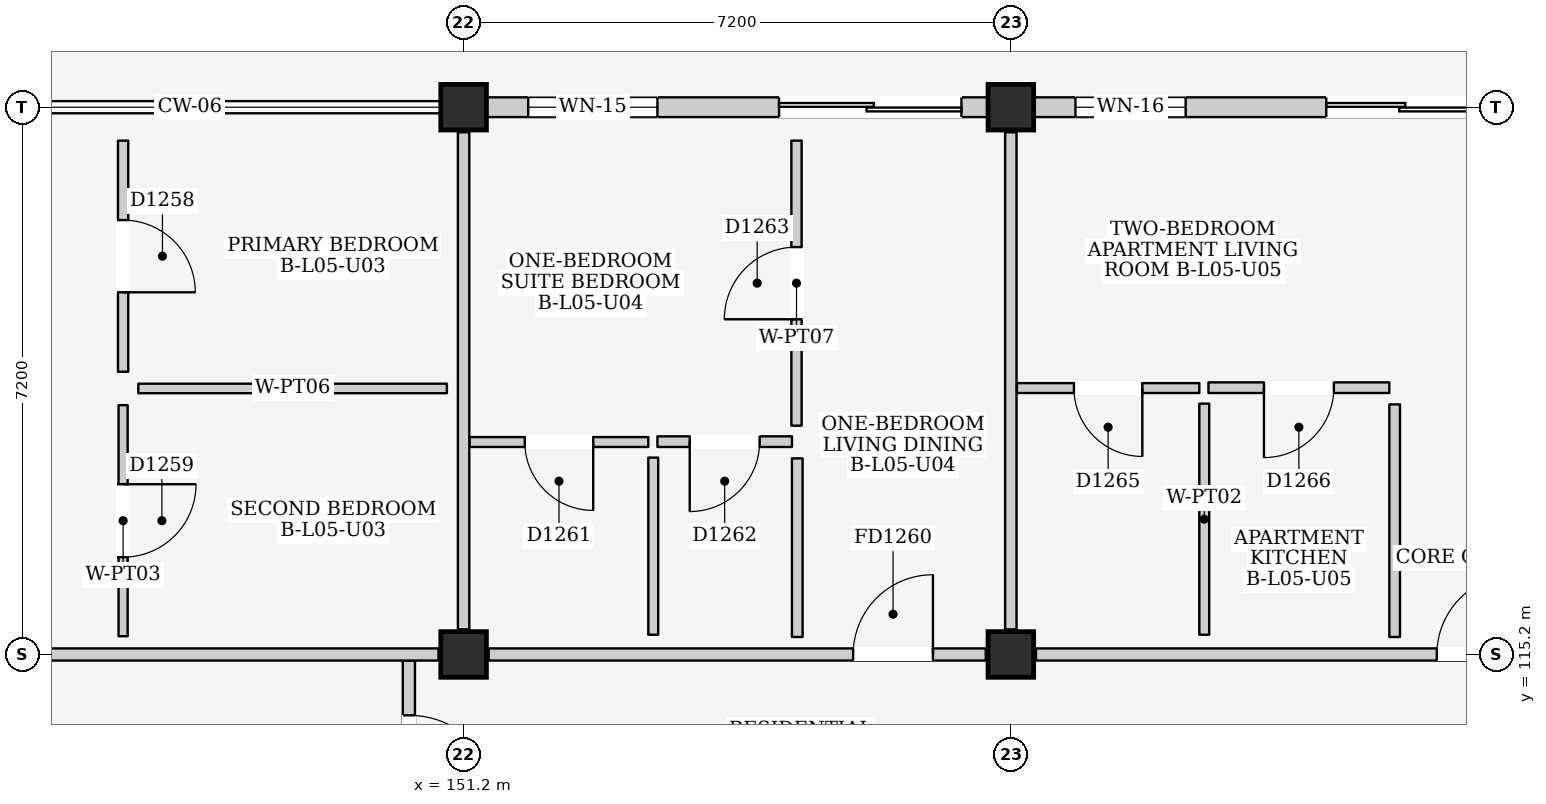
"""IFC4 building model, lengths in metres.
Left out: names, types, materials, properties, quantities, classifications, styles, units other than length and angle.
Written with IfcOpenShell. Run it as: python <this file> out.ifc"""

import sys

from ifc_helpers import new_model, si_unit, direction, frame, frame_2d, origin, origin_2d, place, context, subcontext, project, spatial, rectangle, extrude, element, fill, save


model = new_model("IFC4")
c1 = context("Model", 3, precision=1e-05, world=origin(), true_north=direction((0.0, 1.0)))
c2 = subcontext(c1, "Body", "Model", "MODEL_VIEW")
j1 = project(units=[si_unit("LENGTHUNIT", "METRE"), si_unit("PLANEANGLEUNIT", "RADIAN")], contexts=[c1])
p1 = place(None, origin())
s1 = spatial("IfcSite", under=j1, at=p1, CompositionType="ELEMENT")
p2 = place(p1, origin())
s2 = spatial("IfcBuilding", under=s1, at=p2, CompositionType="ELEMENT")
p3 = place(p2, frame((0.0, 0.0, 18.6)))
s3 = spatial("IfcBuildingStorey", under=s2, at=p3, CompositionType="ELEMENT", Elevation=18.6)
for number, where, z_axis, x_axis in (
    (1, (151.2, 115.2, 0.0), (0.0, 0.0, 1.0), (1.0, 0.0, 0.0)),
    (2, (151.2, 122.4, 0.0), (0.0, 0.0, 1.0), (1.0, 0.0, 0.0)),
    (3, (158.4, 115.2, 0.0), (0.0, 0.0, 1.0), (1.0, 0.0, 0.0)),
    (4, (158.4, 122.4, 0.0), (0.0, 0.0, 1.0), (1.0, 0.0, 0.0)),
):
    element("IfcColumn", number, at=place(p3, frame(where, z_axis=z_axis, x_axis=x_axis)), inside=s3, PredefinedType="COLUMN", context=c2, shape_type="SweptSolid", body=[
        extrude(rectangle(XDim=0.6, YDim=0.6, at=origin_2d()), origin(), (0.0, 0.0, 1.0), 3.3),
    ])
p4 = place(p3, frame((151.5, 122.4, 0.0), z_axis=(0.0, 0.0, 1.0), x_axis=(1.0, 0.0, 0.0)))
e5 = element("IfcWall", 5, at=p4, inside=s3, PredefinedType="ELEMENTEDWALL", context=c2, shape_type="SweptSolid", body=[
    extrude(rectangle(XDim=6.6, YDim=0.26, at=frame_2d((3.3, 0.0))), origin(), (0.0, 0.0, 1.0), 2.595),
])
p5 = place(p4, frame((3.85, 0.0, 0.0)))
e6 = element("IfcOpeningElement", 6, at=p5, cuts=e5, PredefinedType="OPENING", context=c2, shape_type="SweptSolid", body=[
    extrude(rectangle(XDim=2.4, YDim=2.12, at=frame_2d((1.2, 1.06))), frame((0.0, 0.145, 0.0), z_axis=(0.0, -1.0, 0.0), x_axis=(1.0, 0.0, 0.0)), (0.0, 0.0, 1.0), 0.29),
])
p6 = place(p4, frame((0.55, 0.0, 0.9)))
e7 = element("IfcOpeningElement", 7, at=p6, cuts=e5, PredefinedType="OPENING", context=c2, shape_type="SweptSolid", body=[
    extrude(rectangle(XDim=1.7, YDim=1.45, at=frame_2d((0.85, 0.725))), frame((0.0, 0.145, 0.0), z_axis=(0.0, -1.0, 0.0), x_axis=(1.0, 0.0, 0.0)), (0.0, 0.0, 1.0), 0.29),
])
p7 = place(p3, frame((158.7, 122.4, 0.0), z_axis=(0.0, 0.0, 1.0), x_axis=(1.0, 0.0, 0.0)))
e8 = element("IfcWall", 8, at=p7, inside=s3, PredefinedType="ELEMENTEDWALL", context=c2, shape_type="SweptSolid", body=[
    extrude(rectangle(XDim=6.6, YDim=0.26, at=frame_2d((3.3, 0.0))), origin(), (0.0, 0.0, 1.0), 2.595),
])
p8 = place(p7, frame((3.85, 0.0, 0.0)))
e9 = element("IfcOpeningElement", 9, at=p8, cuts=e8, PredefinedType="OPENING", context=c2, shape_type="SweptSolid", body=[
    extrude(rectangle(XDim=2.0, YDim=2.12, at=frame_2d((1.0, 1.06))), frame((0.0, 0.145, 0.0), z_axis=(0.0, -1.0, 0.0), x_axis=(1.0, 0.0, 0.0)), (0.0, 0.0, 1.0), 0.29),
])
p9 = place(p7, frame((0.55, 0.0, 0.9)))
e10 = element("IfcOpeningElement", 10, at=p9, cuts=e8, PredefinedType="OPENING", context=c2, shape_type="SweptSolid", body=[
    extrude(rectangle(XDim=1.45, YDim=1.4, at=frame_2d((0.725, 0.7))), frame((0.0, 0.145, 0.0), z_axis=(0.0, -1.0, 0.0), x_axis=(1.0, 0.0, 0.0)), (0.0, 0.0, 1.0), 0.29),
])
p10 = place(p3, frame((150.48, 111.1, 0.0), z_axis=(0.0, 0.0, 1.0), x_axis=(0.0, 1.0, 0.0)))
e11 = element("IfcWall", 11, at=p10, inside=s3, PredefinedType="PARTITIONING", context=c2, shape_type="SweptSolid", body=[
    extrude(rectangle(XDim=4.02, YDim=0.16, at=frame_2d((2.01, 0.0))), origin(), (0.0, 0.0, 1.0), 3.06),
])
p11 = place(p10, frame((2.1, 0.0, 0.0)))
e12 = element("IfcOpeningElement", 12, at=p11, cuts=e11, PredefinedType="OPENING", context=c2, shape_type="SweptSolid", body=[
    extrude(rectangle(XDim=1.2, YDim=2.2, at=frame_2d((0.6, 1.1))), frame((0.0, 0.095, 0.0), z_axis=(0.0, -1.0, 0.0), x_axis=(1.0, 0.0, 0.0)), (0.0, 0.0, 1.0), 0.19),
])
p12 = place(p3, frame((144.33, 115.2, 0.0), z_axis=(0.0, 0.0, 1.0), x_axis=(1.0, 0.0, 0.0)))
e13 = element("IfcWall", 13, at=p12, inside=s3, PredefinedType="PARTITIONING", context=c2, shape_type="SweptSolid", body=[
    extrude(rectangle(XDim=6.54, YDim=0.16, at=frame_2d((3.27, 0.0))), origin(), (0.0, 0.0, 1.0), 2.445),
])
p13 = place(p3, frame((151.2, 115.53, 0.0), z_axis=(0.0, 0.0, 1.0), x_axis=(0.0, 1.0, 0.0)))
e14 = element("IfcWall", 14, at=p13, inside=s3, PredefinedType="PARTITIONING", context=c2, shape_type="SweptSolid", body=[
    extrude(rectangle(XDim=6.54, YDim=0.15, at=frame_2d((3.27, 0.0))), origin(), (0.0, 0.0, 1.0), 2.545),
])
p14 = place(p3, frame((146.72, 118.92, 0.0), z_axis=(0.0, 0.0, 1.0), x_axis=(0.0, 1.0, 0.0)))
e15 = element("IfcWall", 15, at=p14, inside=s3, PredefinedType="PARTITIONING", context=c2, shape_type="SweptSolid", body=[
    extrude(rectangle(XDim=3.04, YDim=0.135, at=frame_2d((1.52, 0.0))), origin(), (0.0, 0.0, 1.0), 3.06),
])
p15 = place(p14, frame((1.045, 0.0, 0.0)))
e16 = element("IfcOpeningElement", 16, at=p15, cuts=e15, PredefinedType="OPENING", context=c2, shape_type="SweptSolid", body=[
    extrude(rectangle(XDim=0.95, YDim=2.15, at=frame_2d((0.475, 1.075))), frame((0.0, 0.083, 0.0), z_axis=(0.0, -1.0, 0.0), x_axis=(1.0, 0.0, 0.0)), (0.0, 0.0, 1.0), 0.165),
])
p16 = place(p3, frame((146.92, 118.7, 0.0), z_axis=(0.0, 0.0, 1.0), x_axis=(1.0, 0.0, 0.0)))
e17 = element("IfcWall", 17, at=p16, inside=s3, PredefinedType="PARTITIONING", context=c2, shape_type="SweptSolid", body=[
    extrude(rectangle(XDim=4.06, YDim=0.125, at=frame_2d((2.03, 0.0))), origin(), (0.0, 0.0, 1.0), 3.06),
])
p17 = place(p3, frame((146.72, 115.44, 0.0), z_axis=(0.0, 0.0, 1.0), x_axis=(0.0, 1.0, 0.0)))
e18 = element("IfcWall", 18, at=p17, inside=s3, PredefinedType="PARTITIONING", context=c2, shape_type="SweptSolid", body=[
    extrude(rectangle(XDim=3.04, YDim=0.12, at=frame_2d((1.52, 0.0))), origin(), (0.0, 0.0, 1.0), 3.06),
])
p18 = place(p17, frame((1.04, 0.0, 0.0)))
e19 = element("IfcOpeningElement", 19, at=p18, cuts=e18, PredefinedType="OPENING", context=c2, shape_type="SweptSolid", body=[
    extrude(rectangle(XDim=0.96, YDim=2.15, at=frame_2d((0.48, 1.075))), frame((0.0, 0.075, 0.0), z_axis=(0.0, -1.0, 0.0), x_axis=(1.0, 0.0, 0.0)), (0.0, 0.0, 1.0), 0.15),
])
p19 = place(p3, frame((151.53, 115.2, 0.0), z_axis=(0.0, 0.0, 1.0), x_axis=(1.0, 0.0, 0.0)))
e20 = element("IfcWall", 20, at=p19, inside=s3, PredefinedType="PARTITIONING", context=c2, shape_type="SweptSolid", body=[
    extrude(rectangle(XDim=6.54, YDim=0.16, at=frame_2d((3.27, 0.0))), origin(), (0.0, 0.0, 1.0), 2.445),
])
p20 = place(p19, frame((4.795, 0.0, 0.0)))
e21 = element("IfcOpeningElement", 21, at=p20, cuts=e20, PredefinedType="OPENING", context=c2, shape_type="SweptSolid", body=[
    extrude(rectangle(XDim=1.05, YDim=2.15, at=frame_2d((0.525, 1.075))), frame((0.0, 0.095, 0.0), z_axis=(0.0, -1.0, 0.0), x_axis=(1.0, 0.0, 0.0)), (0.0, 0.0, 1.0), 0.19),
])
p21 = place(p3, frame((158.4, 115.53, 0.0), z_axis=(0.0, 0.0, 1.0), x_axis=(0.0, 1.0, 0.0)))
e22 = element("IfcWall", 22, at=p21, inside=s3, PredefinedType="PARTITIONING", context=c2, shape_type="SweptSolid", body=[
    extrude(rectangle(XDim=6.54, YDim=0.15, at=frame_2d((3.27, 0.0))), origin(), (0.0, 0.0, 1.0), 2.545),
])
p22 = place(p3, frame((151.28, 117.995, 0.0), z_axis=(0.0, 0.0, 1.0), x_axis=(1.0, 0.0, 0.0)))
e23 = element("IfcWall", 23, at=p22, inside=s3, PredefinedType="PARTITIONING", context=c2, shape_type="SweptSolid", body=[
    extrude(rectangle(XDim=2.35, YDim=0.13, at=frame_2d((1.175, 0.0))), origin(), (0.0, 0.0, 1.0), 3.06),
])
p23 = place(p22, frame((0.725, 0.0, 0.0)))
e24 = element("IfcOpeningElement", 24, at=p23, cuts=e23, PredefinedType="OPENING", context=c2, shape_type="SweptSolid", body=[
    extrude(rectangle(XDim=0.9, YDim=2.1, at=frame_2d((0.45, 1.05))), frame((0.0, 0.08, 0.0), z_axis=(0.0, -1.0, 0.0), x_axis=(1.0, 0.0, 0.0)), (0.0, 0.0, 1.0), 0.16),
])
p24 = place(p3, frame((153.695, 115.46, 0.0), z_axis=(0.0, 0.0, 1.0), x_axis=(0.0, 1.0, 0.0)))
e25 = element("IfcWall", 25, at=p24, inside=s3, PredefinedType="PARTITIONING", context=c2, shape_type="SweptSolid", body=[
    extrude(rectangle(XDim=2.33, YDim=0.13, at=frame_2d((1.165, 0.0))), origin(), (0.0, 0.0, 1.0), 3.06),
])
p25 = place(p3, frame((153.75, 118.0, 0.0), z_axis=(0.0, 0.0, 1.0), x_axis=(1.0, 0.0, 0.0)))
e26 = element("IfcWall", 26, at=p25, inside=s3, PredefinedType="PARTITIONING", context=c2, shape_type="SweptSolid", body=[
    extrude(rectangle(XDim=1.77, YDim=0.14, at=frame_2d((0.885, 0.0))), origin(), (0.0, 0.0, 1.0), 3.06),
])
p26 = place(p25, frame((0.425, 0.0, 0.0)))
e27 = element("IfcOpeningElement", 27, at=p26, cuts=e26, PredefinedType="OPENING", context=c2, shape_type="SweptSolid", body=[
    extrude(rectangle(XDim=0.92, YDim=2.1, at=frame_2d((0.46, 1.05))), frame((0.0, 0.085, 0.0), z_axis=(0.0, -1.0, 0.0), x_axis=(1.0, 0.0, 0.0)), (0.0, 0.0, 1.0), 0.17),
])
p27 = place(p3, frame((155.59, 115.43, 0.0), z_axis=(0.0, 0.0, 1.0), x_axis=(0.0, 1.0, 0.0)))
e28 = element("IfcWall", 28, at=p27, inside=s3, PredefinedType="PARTITIONING", context=c2, shape_type="SweptSolid", body=[
    extrude(rectangle(XDim=2.35, YDim=0.14, at=frame_2d((1.175, 0.0))), origin(), (0.0, 0.0, 1.0), 3.06),
])
p28 = place(p3, frame((155.58, 118.21, 0.0), z_axis=(0.0, 0.0, 1.0), x_axis=(0.0, 1.0, 0.0)))
e29 = element("IfcWall", 29, at=p28, inside=s3, PredefinedType="PARTITIONING", context=c2, shape_type="SweptSolid", body=[
    extrude(rectangle(XDim=3.75, YDim=0.135, at=frame_2d((1.875, 0.0))), origin(), (0.0, 0.0, 1.0), 3.06),
])
p29 = place(p28, frame((1.4, 0.0, 0.0)))
e30 = element("IfcOpeningElement", 30, at=p29, cuts=e29, PredefinedType="OPENING", context=c2, shape_type="SweptSolid", body=[
    extrude(rectangle(XDim=0.95, YDim=2.15, at=frame_2d((0.475, 1.075))), frame((0.0, 0.083, 0.0), z_axis=(0.0, -1.0, 0.0), x_axis=(1.0, 0.0, 0.0)), (0.0, 0.0, 1.0), 0.165),
])
p30 = place(p3, frame((158.73, 115.2, 0.0), z_axis=(0.0, 0.0, 1.0), x_axis=(1.0, 0.0, 0.0)))
e31 = element("IfcWall", 31, at=p30, inside=s3, PredefinedType="PARTITIONING", context=c2, shape_type="SweptSolid", body=[
    extrude(rectangle(XDim=6.54, YDim=0.16, at=frame_2d((3.27, 0.0))), origin(), (0.0, 0.0, 1.0), 2.445),
])
p31 = place(p30, frame((5.275, 0.0, 0.0)))
e32 = element("IfcOpeningElement", 32, at=p31, cuts=e31, PredefinedType="OPENING", context=c2, shape_type="SweptSolid", body=[
    extrude(rectangle(XDim=1.05, YDim=2.15, at=frame_2d((0.525, 1.075))), frame((0.0, 0.095, 0.0), z_axis=(0.0, -1.0, 0.0), x_axis=(1.0, 0.0, 0.0)), (0.0, 0.0, 1.0), 0.19),
])
p32 = place(p3, frame((158.48, 118.705, 0.0), z_axis=(0.0, 0.0, 1.0), x_axis=(1.0, 0.0, 0.0)))
e33 = element("IfcWall", 33, at=p32, inside=s3, PredefinedType="PARTITIONING", context=c2, shape_type="SweptSolid", body=[
    extrude(rectangle(XDim=2.4, YDim=0.13, at=frame_2d((1.2, 0.0))), origin(), (0.0, 0.0, 1.0), 3.06),
])
p33 = place(p32, frame((0.75, 0.0, 0.0)))
e34 = element("IfcOpeningElement", 34, at=p33, cuts=e33, PredefinedType="OPENING", context=c2, shape_type="SweptSolid", body=[
    extrude(rectangle(XDim=0.9, YDim=2.1, at=frame_2d((0.45, 1.05))), frame((0.0, 0.08, 0.0), z_axis=(0.0, -1.0, 0.0), x_axis=(1.0, 0.0, 0.0)), (0.0, 0.0, 1.0), 0.16),
])
p34 = place(p3, frame((160.945, 115.46, 0.0), z_axis=(0.0, 0.0, 1.0), x_axis=(0.0, 1.0, 0.0)))
e35 = element("IfcWall", 35, at=p34, inside=s3, PredefinedType="PARTITIONING", context=c2, shape_type="SweptSolid", body=[
    extrude(rectangle(XDim=3.04, YDim=0.13, at=frame_2d((1.52, 0.0))), origin(), (0.0, 0.0, 1.0), 3.06),
])
p35 = place(p3, frame((161.0, 118.71, 0.0), z_axis=(0.0, 0.0, 1.0), x_axis=(1.0, 0.0, 0.0)))
e36 = element("IfcWall", 36, at=p35, inside=s3, PredefinedType="PARTITIONING", context=c2, shape_type="SweptSolid", body=[
    extrude(rectangle(XDim=2.38, YDim=0.14, at=frame_2d((1.19, 0.0))), origin(), (0.0, 0.0, 1.0), 3.06),
])
p36 = place(p35, frame((0.73, 0.0, 0.0)))
e37 = element("IfcOpeningElement", 37, at=p36, cuts=e36, PredefinedType="OPENING", context=c2, shape_type="SweptSolid", body=[
    extrude(rectangle(XDim=0.92, YDim=2.1, at=frame_2d((0.46, 1.05))), frame((0.0, 0.085, 0.0), z_axis=(0.0, -1.0, 0.0), x_axis=(1.0, 0.0, 0.0)), (0.0, 0.0, 1.0), 0.17),
])
p37 = place(p3, frame((163.45, 115.43, 0.0), z_axis=(0.0, 0.0, 1.0), x_axis=(0.0, 1.0, 0.0)))
e38 = element("IfcWall", 38, at=p37, inside=s3, PredefinedType="PARTITIONING", context=c2, shape_type="SweptSolid", body=[
    extrude(rectangle(XDim=3.06, YDim=0.14, at=frame_2d((1.53, 0.0))), origin(), (0.0, 0.0, 1.0), 3.06),
])
p38 = place(p5, frame((2.4, 0.0, 0.0), z_axis=(0.0, 0.0, 1.0), x_axis=(-1.0, 0.0, 0.0)))
e39 = element("IfcDoor", 39, at=p38, inside=s3, OperationType="DOUBLE_DOOR_SLIDING", PredefinedType="DOOR", context=c2, shape_type="SweptSolid", body=[
    extrude(rectangle(XDim=2.4, YDim=2.12, at=frame_2d((1.2, 1.06))), frame((0.0, 0.025, 0.0), z_axis=(0.0, -1.0, 0.0), x_axis=(1.0, 0.0, 0.0)), (0.0, 0.0, 1.0), 0.05),
])
fill(e6, e39)
p39 = place(p6, origin())
e40 = element("IfcWindow", 40, at=p39, inside=s3, PartitioningType="DOUBLE_PANEL_VERTICAL", PredefinedType="WINDOW", context=c2, shape_type="SweptSolid", body=[
    extrude(rectangle(XDim=1.7, YDim=1.45, at=frame_2d((0.85, 0.725))), frame((0.0, 0.03, 0.0), z_axis=(0.0, -1.0, 0.0), x_axis=(1.0, 0.0, 0.0)), (0.0, 0.0, 1.0), 0.06),
])
fill(e7, e40)
p40 = place(p8, frame((2.0, 0.0, 0.0), z_axis=(0.0, 0.0, 1.0), x_axis=(-1.0, 0.0, 0.0)))
e41 = element("IfcDoor", 41, at=p40, inside=s3, OperationType="DOUBLE_DOOR_SLIDING", PredefinedType="DOOR", context=c2, shape_type="SweptSolid", body=[
    extrude(rectangle(XDim=2.0, YDim=2.12, at=frame_2d((1.0, 1.06))), frame((0.0, 0.025, 0.0), z_axis=(0.0, -1.0, 0.0), x_axis=(1.0, 0.0, 0.0)), (0.0, 0.0, 1.0), 0.05),
])
fill(e9, e41)
p41 = place(p9, origin())
e42 = element("IfcWindow", 42, at=p41, inside=s3, PartitioningType="DOUBLE_PANEL_VERTICAL", PredefinedType="WINDOW", context=c2, shape_type="SweptSolid", body=[
    extrude(rectangle(XDim=1.45, YDim=1.4, at=frame_2d((0.725, 0.7))), frame((0.0, 0.03, 0.0), z_axis=(0.0, -1.0, 0.0), x_axis=(1.0, 0.0, 0.0)), (0.0, 0.0, 1.0), 0.06),
])
fill(e10, e42)
p42 = place(p11, frame((1.2, 0.0, 0.0), z_axis=(0.0, 0.0, 1.0), x_axis=(-1.0, 0.0, 0.0)))
e43 = element("IfcDoor", 43, at=p42, inside=s3, OperationType="SINGLE_SWING_RIGHT", PredefinedType="DOOR", context=c2, shape_type="SweptSolid", body=[
    extrude(rectangle(XDim=1.2, YDim=2.2, at=frame_2d((0.6, 1.1))), frame((0.0, 0.025, 0.0), z_axis=(0.0, -1.0, 0.0), x_axis=(1.0, 0.0, 0.0)), (0.0, 0.0, 1.0), 0.05),
])
fill(e12, e43)
p43 = place(p15, frame((0.95, 0.0, 0.0), z_axis=(0.0, 0.0, 1.0), x_axis=(-1.0, 0.0, 0.0)))
e44 = element("IfcDoor", 44, at=p43, inside=s3, OperationType="SINGLE_SWING_RIGHT", PredefinedType="DOOR", context=c2, shape_type="SweptSolid", body=[
    extrude(rectangle(XDim=0.95, YDim=2.15, at=frame_2d((0.475, 1.075))), frame((0.0, 0.025, 0.0), z_axis=(0.0, -1.0, 0.0), x_axis=(1.0, 0.0, 0.0)), (0.0, 0.0, 1.0), 0.05),
])
fill(e16, e44)
p44 = place(p18, frame((0.96, 0.0, 0.0), z_axis=(0.0, 0.0, 1.0), x_axis=(-1.0, 0.0, 0.0)))
e45 = element("IfcDoor", 45, at=p44, inside=s3, OperationType="SINGLE_SWING_LEFT", PredefinedType="DOOR", context=c2, shape_type="SweptSolid", body=[
    extrude(rectangle(XDim=0.96, YDim=2.15, at=frame_2d((0.48, 1.075))), frame((0.0, 0.025, 0.0), z_axis=(0.0, -1.0, 0.0), x_axis=(1.0, 0.0, 0.0)), (0.0, 0.0, 1.0), 0.05),
])
fill(e19, e45)
p45 = place(p20, origin())
e46 = element("IfcDoor", 46, at=p45, inside=s3, OperationType="SINGLE_SWING_RIGHT", PredefinedType="DOOR", context=c2, shape_type="SweptSolid", body=[
    extrude(rectangle(XDim=1.05, YDim=2.15, at=frame_2d((0.525, 1.075))), frame((0.0, 0.025, 0.0), z_axis=(0.0, -1.0, 0.0), x_axis=(1.0, 0.0, 0.0)), (0.0, 0.0, 1.0), 0.05),
])
fill(e21, e46)
p46 = place(p23, frame((0.9, 0.0, 0.0), z_axis=(0.0, 0.0, 1.0), x_axis=(-1.0, 0.0, 0.0)))
e47 = element("IfcDoor", 47, at=p46, inside=s3, OperationType="SINGLE_SWING_LEFT", PredefinedType="DOOR", context=c2, shape_type="SweptSolid", body=[
    extrude(rectangle(XDim=0.9, YDim=2.1, at=frame_2d((0.45, 1.05))), frame((0.0, 0.025, 0.0), z_axis=(0.0, -1.0, 0.0), x_axis=(1.0, 0.0, 0.0)), (0.0, 0.0, 1.0), 0.05),
])
fill(e24, e47)
p47 = place(p26, frame((0.92, 0.0, 0.0), z_axis=(0.0, 0.0, 1.0), x_axis=(-1.0, 0.0, 0.0)))
e48 = element("IfcDoor", 48, at=p47, inside=s3, OperationType="SINGLE_SWING_RIGHT", PredefinedType="DOOR", context=c2, shape_type="SweptSolid", body=[
    extrude(rectangle(XDim=0.92, YDim=2.1, at=frame_2d((0.46, 1.05))), frame((0.0, 0.025, 0.0), z_axis=(0.0, -1.0, 0.0), x_axis=(1.0, 0.0, 0.0)), (0.0, 0.0, 1.0), 0.05),
])
fill(e27, e48)
p48 = place(p29, origin())
e49 = element("IfcDoor", 49, at=p48, inside=s3, OperationType="SINGLE_SWING_LEFT", PredefinedType="DOOR", context=c2, shape_type="SweptSolid", body=[
    extrude(rectangle(XDim=0.95, YDim=2.15, at=frame_2d((0.475, 1.075))), frame((0.0, 0.025, 0.0), z_axis=(0.0, -1.0, 0.0), x_axis=(1.0, 0.0, 0.0)), (0.0, 0.0, 1.0), 0.05),
])
fill(e30, e49)
p49 = place(p31, origin())
e50 = element("IfcDoor", 50, at=p49, inside=s3, OperationType="SINGLE_SWING_RIGHT", PredefinedType="DOOR", context=c2, shape_type="SweptSolid", body=[
    extrude(rectangle(XDim=1.05, YDim=2.15, at=frame_2d((0.525, 1.075))), frame((0.0, 0.025, 0.0), z_axis=(0.0, -1.0, 0.0), x_axis=(1.0, 0.0, 0.0)), (0.0, 0.0, 1.0), 0.05),
])
fill(e32, e50)
p50 = place(p33, frame((0.9, 0.0, 0.0), z_axis=(0.0, 0.0, 1.0), x_axis=(-1.0, 0.0, 0.0)))
e51 = element("IfcDoor", 51, at=p50, inside=s3, OperationType="SINGLE_SWING_LEFT", PredefinedType="DOOR", context=c2, shape_type="SweptSolid", body=[
    extrude(rectangle(XDim=0.9, YDim=2.1, at=frame_2d((0.45, 1.05))), frame((0.0, 0.025, 0.0), z_axis=(0.0, -1.0, 0.0), x_axis=(1.0, 0.0, 0.0)), (0.0, 0.0, 1.0), 0.05),
])
fill(e34, e51)
p51 = place(p36, frame((0.92, 0.0, 0.0), z_axis=(0.0, 0.0, 1.0), x_axis=(-1.0, 0.0, 0.0)))
e52 = element("IfcDoor", 52, at=p51, inside=s3, OperationType="SINGLE_SWING_RIGHT", PredefinedType="DOOR", context=c2, shape_type="SweptSolid", body=[
    extrude(rectangle(XDim=0.92, YDim=2.1, at=frame_2d((0.46, 1.05))), frame((0.0, 0.025, 0.0), z_axis=(0.0, -1.0, 0.0), x_axis=(1.0, 0.0, 0.0)), (0.0, 0.0, 1.0), 0.05),
])
fill(e37, e52)
save(model, sys.argv[1])
